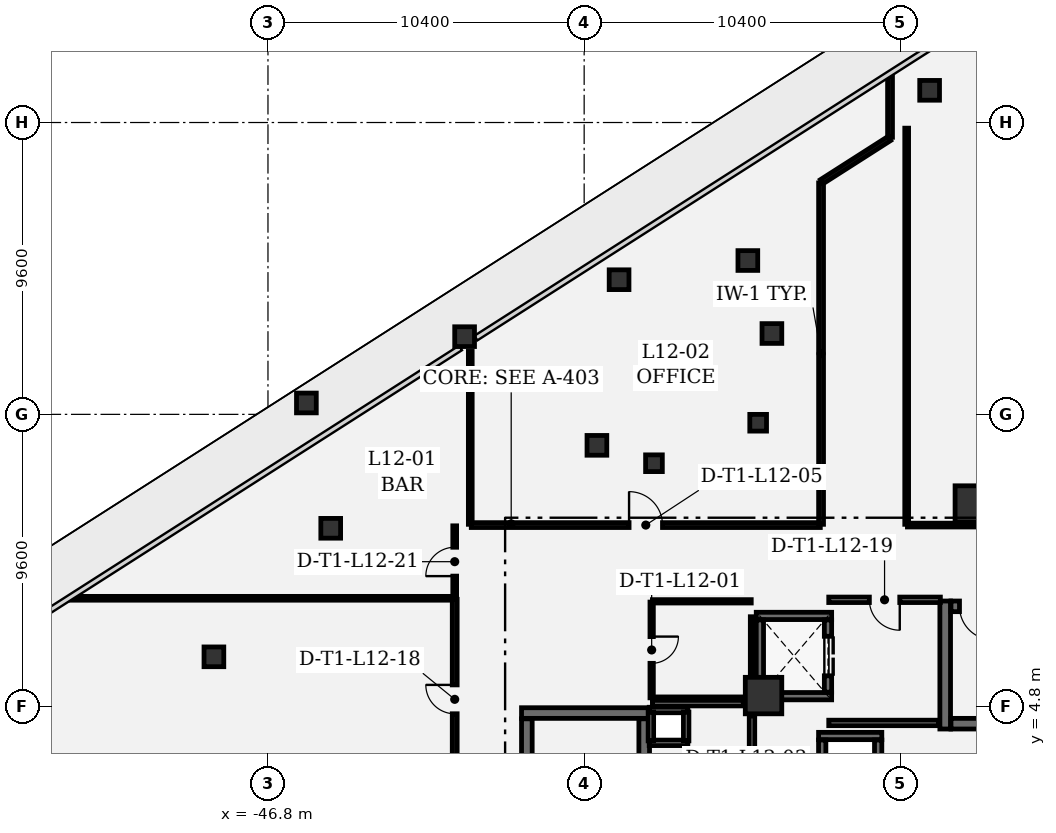
"""IFC4 building model, lengths in metres.
Left out: names, types, materials, properties, quantities, classifications, styles, units other than length and angle.
Written with IfcOpenShell. Run it as: python <this file> out.ifc"""

import sys

from ifc_helpers import new_model, si_unit, direction, frame, frame_2d, origin, origin_2d, place, context, subcontext, project, spatial, rectangle, extrude, element, fill, save


model = new_model("IFC4")
c1 = context("Model", 3, precision=1e-05, world=origin(), true_north=direction((0.0, 1.0)))
c2 = subcontext(c1, "Body", "Model", "MODEL_VIEW")
j1 = project(units=[si_unit("LENGTHUNIT", "METRE"), si_unit("PLANEANGLEUNIT", "RADIAN")], contexts=[c1])
p1 = place(None, origin())
s1 = spatial("IfcSite", under=j1, at=p1, CompositionType="ELEMENT")
p2 = place(p1, origin())
s2 = spatial("IfcBuilding", under=s1, at=p2, CompositionType="ELEMENT")
p3 = place(p2, frame((0.0, 0.0, 57.6)))
s3 = spatial("IfcBuildingStorey", under=s2, at=p3, CompositionType="ELEMENT", Elevation=57.6)
for number, where, z_axis, x_axis in (
    (1, (-23.6, 11.45, 0.0), (0.0, 0.0, 1.0), (1.0, 0.0, 0.0)),
    (2, (-30.5, 5.15, 0.0), (0.0, 0.0, 1.0), (1.0, 0.0, 0.0)),
):
    element("IfcColumn", number, at=place(p3, frame(where, z_axis=z_axis, x_axis=x_axis)), inside=s3, PredefinedType="COLUMN", context=c2, shape_type="SweptSolid", body=[
        extrude(rectangle(XDim=1.2, YDim=1.2, at=origin_2d()), origin(), (0.0, 0.0, 1.0), 4.2),
    ])
for number, where, z_axis, x_axis in (
    (3, (-45.536, 14.775, 0.0), (0.0, 0.0, 1.0), (1.0, 0.0, 0.0)),
    (4, (-40.333, 16.956, 0.0), (0.0, 0.0, 1.0), (1.0, 0.0, 0.0)),
    (5, (-35.252, 18.829, 0.0), (0.0, 0.0, 1.0), (1.0, 0.0, 0.0)),
    (6, (-25.038, 25.059, 0.0), (0.0, 0.0, 1.0), (1.0, 0.0, 0.0)),
    (7, (-31.016, 19.46, 0.0), (0.0, 0.0, 1.0), (1.0, 0.0, 0.0)),
    (8, (-44.736, 10.652, 0.0), (0.0, 0.0, 1.0), (1.0, 0.0, 0.0)),
    (9, (-48.578, 6.425, 0.0), (0.0, 0.0, 1.0), (1.0, 0.0, 0.0)),
    (10, (-35.981, 13.381, 0.0), (0.0, 0.0, 1.0), (1.0, 0.0, 0.0)),
    (11, (-30.225, 17.06, 0.0), (0.0, 0.0, 1.0), (1.0, 0.0, 0.0)),
):
    element("IfcColumn", number, at=place(p3, frame(where, z_axis=z_axis, x_axis=x_axis)), inside=s3, PredefinedType="COLUMN", context=c2, shape_type="SweptSolid", body=[
        extrude(rectangle(XDim=0.65, YDim=0.65, at=origin_2d()), origin(), (0.0, 0.0, 1.0), 4.2),
    ])
for number, where, z_axis, x_axis in (
    (12, (-34.104, 12.792, 0.0), (0.0, 0.0, 1.0), (1.0, 0.0, 0.0)),
    (13, (-30.677, 14.124, 0.0), (0.0, 0.0, 1.0), (1.0, 0.0, 0.0)),
):
    element("IfcColumn", number, at=place(p3, frame(where, z_axis=z_axis, x_axis=x_axis)), inside=s3, PredefinedType="COLUMN", context=c2, shape_type="SweptSolid", body=[
        extrude(rectangle(XDim=0.55, YDim=0.55, at=origin_2d()), origin(), (0.0, 0.0, 1.0), 4.2),
    ])
p4 = place(p3, frame((-24.525, 8.26, 0.0), z_axis=(0.0, 0.0, 1.0), x_axis=(0.0, -1.0, 0.0)))
e14 = element("IfcWall", 14, at=p4, inside=s3, PredefinedType="SHEAR", context=c2, shape_type="SweptSolid", body=[
    extrude(rectangle(XDim=4.21, YDim=0.35, at=frame_2d((2.105, 0.0))), origin(), (0.0, 0.0, 1.0), 3.92),
])
p5 = place(p3, frame((-24.335, 4.225, 0.0), z_axis=(0.0, 0.0, 1.0), x_axis=(1.0, 0.0, 0.0)))
e15 = element("IfcWall", 15, at=p5, inside=s3, PredefinedType="SHEAR", context=c2, shape_type="SweptSolid", body=[
    extrude(rectangle(XDim=8.12, YDim=0.35, at=frame_2d((4.06, 0.0))), origin(), (0.0, 0.0, 1.0), 3.92),
])
p6 = place(p3, frame((-16.215, 8.085, 0.0), z_axis=(0.0, 0.0, 1.0), x_axis=(-1.0, 0.0, 0.0)))
e16 = element("IfcWall", 16, at=p6, inside=s3, PredefinedType="SHEAR", context=c2, shape_type="SweptSolid", body=[
    extrude(rectangle(XDim=8.12, YDim=0.35, at=frame_2d((4.06, 0.0))), origin(), (0.0, 0.0, 1.0), 3.92),
])
p7 = place(p6, frame((6.74, 0.0, 0.0)))
e17 = element("IfcOpeningElement", 17, at=p7, cuts=e16, PredefinedType="OPENING", context=c2, shape_type="SweptSolid", body=[
    extrude(rectangle(XDim=1.1, YDim=2.2, at=frame_2d((0.55, 1.1))), frame((0.0, 0.185, 0.0), z_axis=(0.0, -1.0, 0.0), x_axis=(1.0, 0.0, 0.0)), (0.0, 0.0, 1.0), 0.37),
])
p8 = place(p3, frame((-34.25, 4.575, 0.0), z_axis=(0.0, 0.0, 1.0), x_axis=(-1.0, 0.0, 0.0)))
e18 = element("IfcWall", 18, at=p8, inside=s3, PredefinedType="SHEAR", context=c2, shape_type="SweptSolid", body=[
    extrude(rectangle(XDim=4.21, YDim=0.35, at=frame_2d((2.105, 0.0))), origin(), (0.0, 0.0, 1.0), 3.92),
])
for number, where, z_axis, x_axis in (
    (19, (-34.425, -4.385, 0.0), (0.0, 0.0, 1.0), (0.0, 1.0, 0.0)),
    (20, (-38.285, 4.385, 0.0), (0.0, 0.0, 1.0), (0.0, -1.0, 0.0)),
):
    element("IfcWall", number, at=place(p3, frame(where, z_axis=z_axis, x_axis=x_axis)), inside=s3, PredefinedType="SHEAR", context=c2, shape_type="SweptSolid", body=[
        extrude(rectangle(XDim=8.77, YDim=0.35, at=frame_2d((4.385, 0.0))), origin(), (0.0, 0.0, 1.0), 3.92),
    ])
for number, where, z_axis, x_axis in (
    (21, (-28.26, 5.13, 0.0), (0.0, 0.0, 1.0), (-1.0, 0.0, 0.0)),
    (22, (-30.74, 7.77, 0.0), (0.0, 0.0, 1.0), (1.0, 0.0, 0.0)),
):
    element("IfcWall", number, at=place(p3, frame(where, z_axis=z_axis, x_axis=x_axis)), inside=s3, PredefinedType="SHEAR", context=c2, shape_type="SweptSolid", body=[
        extrude(rectangle(XDim=2.48, YDim=0.24, at=frame_2d((1.24, 0.0))), origin(), (0.0, 0.0, 1.0), 3.92),
    ])
p9 = place(p3, frame((-30.62, 5.262, 0.0), z_axis=(0.0, 0.0, 1.0), x_axis=(0.0, 1.0, 0.0)))
e23 = element("IfcWall", 23, at=p9, inside=s3, PredefinedType="SHEAR", context=c2, shape_type="SweptSolid", body=[
    extrude(rectangle(XDim=2.376, YDim=0.24, at=frame_2d((1.188, 0.0))), origin(), (0.0, 0.0, 1.0), 3.92),
])
p10 = place(p3, frame((-28.38, 7.638, 0.0), z_axis=(0.0, 0.0, 1.0), x_axis=(0.0, -1.0, 0.0)))
e24 = element("IfcWall", 24, at=p10, inside=s3, PredefinedType="SHEAR", context=c2, shape_type="SweptSolid", body=[
    extrude(rectangle(XDim=2.376, YDim=0.24, at=frame_2d((1.188, 0.0))), origin(), (0.0, 0.0, 1.0), 3.92),
])
p11 = place(p10, frame((0.538, 0.0, 0.0)))
e25 = element("IfcOpeningElement", 25, at=p11, cuts=e24, PredefinedType="OPENING", context=c2, shape_type="SweptSolid", body=[
    extrude(rectangle(XDim=1.3, YDim=2.3, at=frame_2d((0.65, 1.15))), frame((0.0, 0.13, 0.0), z_axis=(0.0, -1.0, 0.0), x_axis=(1.0, 0.0, 0.0)), (0.0, 0.0, 1.0), 0.26),
])
p12 = place(p3, frame((-28.69, 3.82, 0.0), z_axis=(0.0, 0.0, 1.0), x_axis=(1.0, 0.0, 0.0)))
e26 = element("IfcWall", 26, at=p12, inside=s3, PredefinedType="SHEAR", context=c2, shape_type="SweptSolid", body=[
    extrude(rectangle(XDim=2.08, YDim=0.24, at=frame_2d((1.04, 0.0))), origin(), (0.0, 0.0, 1.0), 3.92),
])
for number, where, z_axis, x_axis in (
    (27, (-28.57, 1.562, 0.0), (0.0, 0.0, 1.0), (0.0, 1.0, 0.0)),
    (28, (-26.73, 3.688, 0.0), (0.0, 0.0, 1.0), (0.0, -1.0, 0.0)),
):
    element("IfcWall", number, at=place(p3, frame(where, z_axis=z_axis, x_axis=x_axis)), inside=s3, PredefinedType="SHEAR", context=c2, shape_type="SweptSolid", body=[
        extrude(rectangle(XDim=2.126, YDim=0.24, at=frame_2d((1.063, 0.0))), origin(), (0.0, 0.0, 1.0), 3.92),
    ])
for number, where, z_axis, x_axis in (
    (29, (-32.99, 3.595, 0.0), (0.0, 0.0, 1.0), (-1.0, 0.0, 0.0)),
    (30, (-34.26, 4.675, 0.0), (0.0, 0.0, 1.0), (1.0, 0.0, 0.0)),
):
    element("IfcWall", number, at=place(p3, frame(where, z_axis=z_axis, x_axis=x_axis)), inside=s3, PredefinedType="PARTITIONING", context=c2, shape_type="SweptSolid", body=[
        extrude(rectangle(XDim=1.27, YDim=0.18, at=frame_2d((0.635, 0.0))), origin(), (0.0, 0.0, 1.0), 3.92),
    ])
for number, where, z_axis, x_axis in (
    (31, (-34.205, 3.66, 0.0), (0.0, 0.0, 1.0), (0.0, 1.0, 0.0)),
    (32, (-33.045, 4.61, 0.0), (0.0, 0.0, 1.0), (0.0, -1.0, 0.0)),
):
    element("IfcWall", number, at=place(p3, frame(where, z_axis=z_axis, x_axis=x_axis)), inside=s3, PredefinedType="PARTITIONING", context=c2, shape_type="SweptSolid", body=[
        extrude(rectangle(XDim=0.95, YDim=0.18, at=frame_2d((0.475, 0.0))), origin(), (0.0, 0.0, 1.0), 3.92),
    ])
p13 = place(p3, frame((-28.355, 4.25, 0.0), z_axis=(0.0, 0.0, 1.0), x_axis=(1.0, 0.0, 0.0)))
e33 = element("IfcWall", 33, at=p13, inside=s3, PredefinedType="PARTITIONING", context=c2, shape_type="SweptSolid", body=[
    extrude(rectangle(XDim=3.622, YDim=0.18, at=frame_2d((1.811, 0.0))), origin(), (0.0, 0.0, 1.0), 3.92),
])
p14 = place(p3, frame((-24.684, 8.3, 0.0), z_axis=(0.0, 0.0, 1.0), x_axis=(-1.0, 0.0, 0.0)))
e34 = element("IfcWall", 34, at=p14, inside=s3, PredefinedType="PARTITIONING", context=c2, shape_type="SweptSolid", body=[
    extrude(rectangle(XDim=3.671, YDim=0.18, at=frame_2d((1.835, 0.0))), origin(), (0.0, 0.0, 1.0), 3.92),
])
p15 = place(p14, frame((1.335, 0.0, 0.0)))
e35 = element("IfcOpeningElement", 35, at=p15, cuts=e34, PredefinedType="OPENING", context=c2, shape_type="SweptSolid", body=[
    extrude(rectangle(XDim=1.0, YDim=2.15, at=frame_2d((0.5, 1.075))), frame((0.0, 0.1, 0.0), z_axis=(0.0, -1.0, 0.0), x_axis=(1.0, 0.0, 0.0)), (0.0, 0.0, 1.0), 0.2),
])
p16 = place(p3, frame((-34.18, 8.225, 0.0), z_axis=(0.0, 0.0, 1.0), x_axis=(0.0, -1.0, 0.0)))
e36 = element("IfcWall", 36, at=p16, inside=s3, PredefinedType="PARTITIONING", context=c2, shape_type="SweptSolid", body=[
    extrude(rectangle(XDim=3.15, YDim=0.11, at=frame_2d((1.575, 0.0))), origin(), (0.0, 0.0, 1.0), 3.92),
])
p17 = place(p16, frame((1.135, 0.0, 0.0)))
e37 = element("IfcOpeningElement", 37, at=p17, cuts=e36, PredefinedType="OPENING", context=c2, shape_type="SweptSolid", body=[
    extrude(rectangle(XDim=0.88, YDim=2.1, at=frame_2d((0.44, 1.05))), frame((0.0, 0.065, 0.0), z_axis=(0.0, -1.0, 0.0), x_axis=(1.0, 0.0, 0.0)), (0.0, 0.0, 1.0), 0.13),
])
p18 = place(p3, frame((-34.155, 5.05, 0.0), z_axis=(0.0, 0.0, 1.0), x_axis=(1.0, 0.0, 0.0)))
e38 = element("IfcWall", 38, at=p18, inside=s3, PredefinedType="PARTITIONING", context=c2, shape_type="SweptSolid", body=[
    extrude(rectangle(XDim=2.99, YDim=0.11, at=frame_2d((1.495, 0.0))), origin(), (0.0, 0.0, 1.0), 3.92),
])
p19 = place(p3, frame((-30.88, 5.815, 0.0), z_axis=(0.0, 0.0, 1.0), x_axis=(0.0, 1.0, 0.0)))
e39 = element("IfcWall", 39, at=p19, inside=s3, PredefinedType="PARTITIONING", context=c2, shape_type="SweptSolid", body=[
    extrude(rectangle(XDim=1.928, YDim=0.11, at=frame_2d((0.964, 0.0))), origin(), (0.0, 0.0, 1.0), 3.92),
])
p20 = place(p3, frame((-30.905, 8.25, 0.0), z_axis=(0.0, 0.0, 1.0), x_axis=(-1.0, 0.0, 0.0)))
e40 = element("IfcWall", 40, at=p20, inside=s3, PredefinedType="PARTITIONING", context=c2, shape_type="SweptSolid", body=[
    extrude(rectangle(XDim=3.25, YDim=0.11, at=frame_2d((1.625, 0.0))), origin(), (0.0, 0.0, 1.0), 3.92),
])
p21 = place(p3, frame((-30.88, 1.625, 0.0), z_axis=(0.0, 0.0, 1.0), x_axis=(0.0, 1.0, 0.0)))
e41 = element("IfcWall", 41, at=p21, inside=s3, PredefinedType="PARTITIONING", context=c2, shape_type="SweptSolid", body=[
    extrude(rectangle(XDim=2.86, YDim=0.18, at=frame_2d((1.43, 0.0))), origin(), (0.0, 0.0, 1.0), 3.92),
])
p22 = place(p3, frame((-31.165, 4.9, 0.0), z_axis=(0.0, 0.0, 1.0), x_axis=(-1.0, 0.0, 0.0)))
e42 = element("IfcWall", 42, at=p22, inside=s3, PredefinedType="PARTITIONING", context=c2, shape_type="SweptSolid", body=[
    extrude(rectangle(XDim=2.99, YDim=0.18, at=frame_2d((1.495, 0.0))), origin(), (0.0, 0.0, 1.0), 3.92),
])
p23 = place(p3, frame((-40.658, 8.375, 0.0), z_axis=(0.0, 0.0, 1.0), x_axis=(0.0, 1.0, 0.0)))
e43 = element("IfcWall", 43, at=p23, inside=s3, PredefinedType="PARTITIONING", context=c2, shape_type="SweptSolid", body=[
    extrude(rectangle(XDim=2.358, YDim=0.125, at=frame_2d((1.179, 0.0))), origin(), (0.0, 0.0, 1.0), 3.92),
])
p24 = place(p23, frame((0.704, 0.0, 0.0)))
e44 = element("IfcOpeningElement", 44, at=p24, cuts=e43, PredefinedType="OPENING", context=c2, shape_type="SweptSolid", body=[
    extrude(rectangle(XDim=0.95, YDim=2.15, at=frame_2d((0.475, 1.075))), frame((0.0, 0.073, 0.0), z_axis=(0.0, -1.0, 0.0), x_axis=(1.0, 0.0, 0.0)), (0.0, 0.0, 1.0), 0.145),
])
p25 = place(p3, frame((-40.146, 10.783, 0.0), z_axis=(0.0, 0.0, 1.0), x_axis=(0.0, 1.0, 0.0)))
e45 = element("IfcWall", 45, at=p25, inside=s3, PredefinedType="PARTITIONING", context=c2, shape_type="SweptSolid", body=[
    extrude(rectangle(XDim=5.687, YDim=0.125, at=frame_2d((2.843, 0.0))), origin(), (0.0, 0.0, 1.0), 3.92),
])
p26 = place(p3, frame((-53.274, 8.35, 0.0), z_axis=(0.0, 0.0, 1.0), x_axis=(1.0, 0.0, 0.0)))
e46 = element("IfcWall", 46, at=p26, inside=s3, PredefinedType="PARTITIONING", context=c2, shape_type="SweptSolid", body=[
    extrude(rectangle(XDim=12.591, YDim=0.125, at=frame_2d((6.295, 0.0))), origin(), (0.0, 0.0, 1.0), 2.89),
])
p27 = place(p3, frame((-40.113, 10.758, 0.0), z_axis=(0.0, 0.0, 1.0), x_axis=(1.0, 0.0, 0.0)))
e47 = element("IfcWall", 47, at=p27, inside=s3, PredefinedType="PARTITIONING", context=c2, shape_type="SweptSolid", body=[
    extrude(rectangle(XDim=11.48, YDim=0.16, at=frame_2d((5.74, 0.0))), origin(), (0.0, 0.0, 1.0), 3.433),
])
p28 = place(p27, frame((5.19, 0.0, 0.0)))
e48 = element("IfcOpeningElement", 48, at=p28, cuts=e47, PredefinedType="OPENING", context=c2, shape_type="SweptSolid", body=[
    extrude(rectangle(XDim=1.1, YDim=2.15, at=frame_2d((0.55, 1.075))), frame((0.0, 0.09, 0.0), z_axis=(0.0, -1.0, 0.0), x_axis=(1.0, 0.0, 0.0)), (0.0, 0.0, 1.0), 0.18),
])
p29 = place(p3, frame((-28.608, 10.783, 0.0), z_axis=(0.0, 0.0, 1.0), x_axis=(0.0, 1.0, 0.0)))
e49 = element("IfcWall", 49, at=p29, inside=s3, PredefinedType="PARTITIONING", context=c2, shape_type="SweptSolid", body=[
    extrude(rectangle(XDim=11.231, YDim=0.16, at=frame_2d((5.615, 0.0))), origin(), (0.0, 0.0, 1.0), 3.433),
])
p30 = place(p3, frame((-26.361, 23.475, 0.0), z_axis=(0.0, 0.0, 1.0), x_axis=(-0.842613569098, -0.538518684143, 0.0)))
e50 = element("IfcWall", 50, at=p30, inside=s3, PredefinedType="PARTITIONING", context=c2, shape_type="SweptSolid", body=[
    extrude(rectangle(XDim=2.642, YDim=0.16, at=frame_2d((1.321, 0.0))), origin(), (0.0, 0.0, 1.0), 3.92),
])
p31 = place(p3, frame((-26.34, 23.514, 0.0), z_axis=(0.0, 0.0, 1.0), x_axis=(0.0, 1.0, 0.0)))
e51 = element("IfcWall", 51, at=p31, inside=s3, PredefinedType="PARTITIONING", context=c2, shape_type="SweptSolid", body=[
    extrude(rectangle(XDim=2.022, YDim=0.16, at=frame_2d((1.011, 0.0))), origin(), (0.0, 0.0, 1.0), 3.92),
])
p32 = place(p3, frame((-25.792, 23.814, 0.0), z_axis=(0.0, 0.0, 1.0), x_axis=(0.0, -1.0, 0.0)))
e52 = element("IfcWall", 52, at=p32, inside=s3, PredefinedType="PARTITIONING", context=c2, shape_type="SweptSolid", body=[
    extrude(rectangle(XDim=13.031, YDim=0.125, at=frame_2d((6.515, 0.0))), origin(), (0.0, 0.0, 1.0), 3.92),
])
p33 = place(p3, frame((-25.767, 10.758, 0.0), z_axis=(0.0, 0.0, 1.0), x_axis=(1.0, 0.0, 0.0)))
e53 = element("IfcWall", 53, at=p33, inside=s3, PredefinedType="PARTITIONING", context=c2, shape_type="SweptSolid", body=[
    extrude(rectangle(XDim=11.404, YDim=0.125, at=frame_2d((5.702, 0.0))), origin(), (0.0, 0.0, 1.0), 2.957),
])
p34 = place(p33, frame((5.227, 0.0, 0.0)))
e54 = element("IfcOpeningElement", 54, at=p34, cuts=e53, PredefinedType="OPENING", context=c2, shape_type="SweptSolid", body=[
    extrude(rectangle(XDim=0.95, YDim=2.15, at=frame_2d((0.475, 1.075))), frame((0.0, 0.073, 0.0), z_axis=(0.0, -1.0, 0.0), x_axis=(1.0, 0.0, 0.0)), (0.0, 0.0, 1.0), 0.145),
])
p35 = place(p3, frame((-40.658, 1.736, 0.0), z_axis=(0.0, 0.0, 1.0), x_axis=(0.0, 1.0, 0.0)))
e55 = element("IfcWall", 55, at=p35, inside=s3, PredefinedType="PARTITIONING", context=c2, shape_type="SweptSolid", body=[
    extrude(rectangle(XDim=6.581, YDim=0.16, at=frame_2d((3.291, 0.0))), origin(), (0.0, 0.0, 1.0), 3.92),
])
p36 = place(p35, frame((2.815, 0.0, 0.0)))
e56 = element("IfcOpeningElement", 56, at=p36, cuts=e55, PredefinedType="OPENING", context=c2, shape_type="SweptSolid", body=[
    extrude(rectangle(XDim=0.95, YDim=2.15, at=frame_2d((0.475, 1.075))), frame((0.0, 0.09, 0.0), z_axis=(0.0, -1.0, 0.0), x_axis=(1.0, 0.0, 0.0)), (0.0, 0.0, 1.0), 0.18),
])
p37 = place(p7, origin())
e57 = element("IfcDoor", 57, at=p37, inside=s3, OperationType="SINGLE_SWING_LEFT", PredefinedType="DOOR", context=c2, shape_type="SweptSolid", body=[
    extrude(rectangle(XDim=1.1, YDim=2.2, at=frame_2d((0.55, 1.1))), frame((0.0, 0.025, 0.0), z_axis=(0.0, -1.0, 0.0), x_axis=(1.0, 0.0, 0.0)), (0.0, 0.0, 1.0), 0.05),
])
fill(e17, e57)
p38 = place(p11, origin())
e58 = element("IfcDoor", 58, at=p38, inside=s3, OperationType="DOUBLE_DOOR_SLIDING", PredefinedType="DOOR", context=c2, shape_type="SweptSolid", body=[
    extrude(rectangle(XDim=1.3, YDim=2.3, at=frame_2d((0.65, 1.15))), frame((0.0, 0.025, 0.0), z_axis=(0.0, -1.0, 0.0), x_axis=(1.0, 0.0, 0.0)), (0.0, 0.0, 1.0), 0.05),
])
fill(e25, e58)
p39 = place(p17, origin())
e59 = element("IfcDoor", 59, at=p39, inside=s3, OperationType="SINGLE_SWING_LEFT", PredefinedType="DOOR", context=c2, shape_type="SweptSolid", body=[
    extrude(rectangle(XDim=0.88, YDim=2.1, at=frame_2d((0.44, 1.05))), frame((0.0, 0.025, 0.0), z_axis=(0.0, -1.0, 0.0), x_axis=(1.0, 0.0, 0.0)), (0.0, 0.0, 1.0), 0.05),
])
fill(e37, e59)
p40 = place(p28, origin())
e60 = element("IfcDoor", 60, at=p40, inside=s3, OperationType="SINGLE_SWING_LEFT", PredefinedType="DOOR", context=c2, shape_type="SweptSolid", body=[
    extrude(rectangle(XDim=1.1, YDim=2.15, at=frame_2d((0.55, 1.075))), frame((0.0, 0.025, 0.0), z_axis=(0.0, -1.0, 0.0), x_axis=(1.0, 0.0, 0.0)), (0.0, 0.0, 1.0), 0.05),
])
fill(e48, e60)
p41 = place(p36, origin())
e61 = element("IfcDoor", 61, at=p41, inside=s3, OperationType="SINGLE_SWING_RIGHT", PredefinedType="DOOR", context=c2, shape_type="SweptSolid", body=[
    extrude(rectangle(XDim=0.95, YDim=2.15, at=frame_2d((0.475, 1.075))), frame((0.0, 0.025, 0.0), z_axis=(0.0, -1.0, 0.0), x_axis=(1.0, 0.0, 0.0)), (0.0, 0.0, 1.0), 0.05),
])
fill(e56, e61)
p42 = place(p15, origin())
e62 = element("IfcDoor", 62, at=p42, inside=s3, OperationType="SINGLE_SWING_LEFT", PredefinedType="DOOR", context=c2, shape_type="SweptSolid", body=[
    extrude(rectangle(XDim=1.0, YDim=2.15, at=frame_2d((0.5, 1.075))), frame((0.0, 0.025, 0.0), z_axis=(0.0, -1.0, 0.0), x_axis=(1.0, 0.0, 0.0)), (0.0, 0.0, 1.0), 0.05),
])
fill(e35, e62)
p43 = place(p24, origin())
e63 = element("IfcDoor", 63, at=p43, inside=s3, OperationType="SINGLE_SWING_LEFT", PredefinedType="DOOR", context=c2, shape_type="SweptSolid", body=[
    extrude(rectangle(XDim=0.95, YDim=2.15, at=frame_2d((0.475, 1.075))), frame((0.0, 0.025, 0.0), z_axis=(0.0, -1.0, 0.0), x_axis=(1.0, 0.0, 0.0)), (0.0, 0.0, 1.0), 0.05),
])
fill(e44, e63)
save(model, sys.argv[1])
